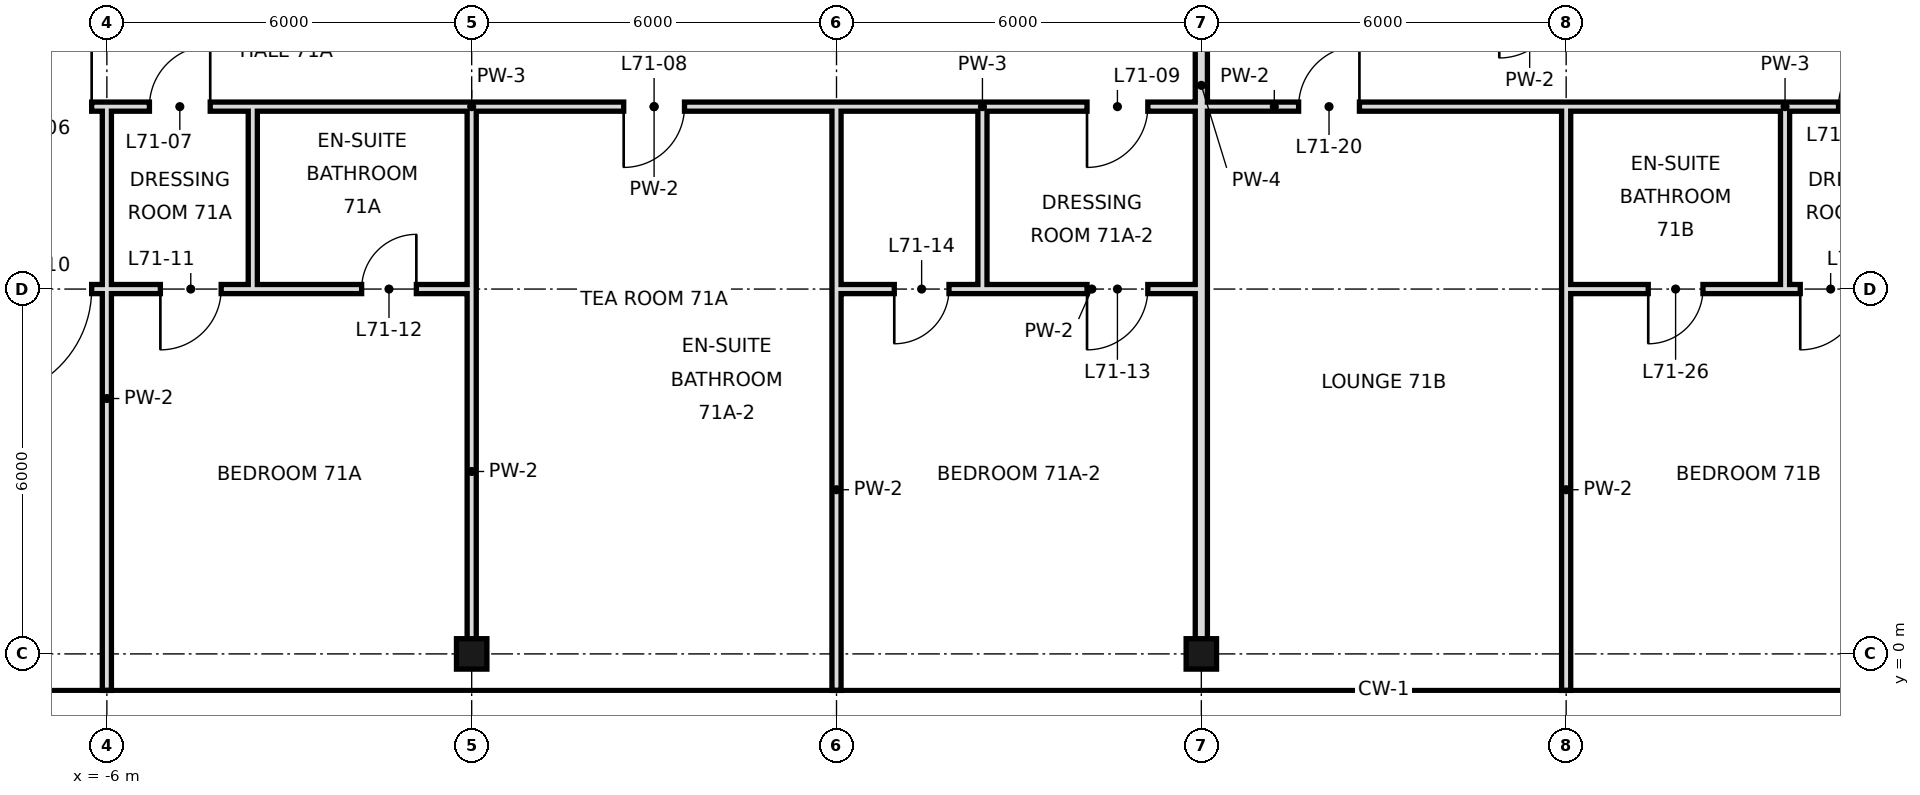
"""IFC4 building model, lengths in metres.
Left out: names, types, materials, properties, quantities, classifications, styles, units other than length and angle.
Written with IfcOpenShell. Run it as: python <this file> out.ifc"""

import sys

from ifc_helpers import new_model, si_unit, direction, frame, frame_2d, origin, origin_2d, place, context, subcontext, project, spatial, rectangle, hollow_rectangle, extrude, element, fill, save


model = new_model("IFC4")
c1 = context("Model", 3, precision=1e-05, world=origin(), true_north=direction((0.0, 1.0)))
c2 = subcontext(c1, "Body", "Model", "MODEL_VIEW")
j1 = project(units=[si_unit("LENGTHUNIT", "METRE"), si_unit("PLANEANGLEUNIT", "RADIAN")], contexts=[c1])
p1 = place(None, origin())
s1 = spatial("IfcSite", under=j1, at=p1, CompositionType="ELEMENT")
p2 = place(p1, origin())
s2 = spatial("IfcBuilding", under=s1, at=p2, CompositionType="ELEMENT")
p3 = place(p2, frame((0.0, 0.0, 301.6)))
s3 = spatial("IfcBuildingStorey", under=s2, at=p3, CompositionType="ELEMENT", Elevation=301.6)
for number, where, z_axis, x_axis in (
    (1, (0.0, 0.0, 0.0), (0.0, 0.0, 1.0), (1.0, 0.0, 0.0)),
    (2, (12.0, 0.0, 0.0), (0.0, 0.0, 1.0), (1.0, 0.0, 0.0)),
):
    element("IfcColumn", number, at=place(p3, frame(where, z_axis=z_axis, x_axis=x_axis)), inside=s3, PredefinedType="COLUMN", context=c2, shape_type="SweptSolid", body=[
        extrude(hollow_rectangle(XDim=0.5, YDim=0.5, WallThickness=0.025, at=origin_2d()), origin(), (0.0, 0.0, 1.0), 3.6),
    ])
p4 = place(p3, frame((-3.6, 6.0, 0.0), z_axis=(0.0, 0.0, 1.0), x_axis=(0.0, 1.0, 0.0)))
e3 = element("IfcWall", 3, at=p4, inside=s3, PredefinedType="PARTITIONING", context=c2, shape_type="SweptSolid", body=[
    extrude(rectangle(XDim=3.0, YDim=0.15, at=frame_2d((1.5, 0.0))), origin(), (0.0, 0.0, 1.0), 3.42),
])
p5 = place(p3, frame((-6.0, -0.6, 0.0), z_axis=(0.0, 0.0, 1.0), x_axis=(0.0, 1.0, 0.0)))
e4 = element("IfcWall", 4, at=p5, inside=s3, PredefinedType="PARTITIONING", context=c2, shape_type="SweptSolid", body=[
    extrude(rectangle(XDim=9.6, YDim=0.15, at=frame_2d((4.8, 0.0))), origin(), (0.0, 0.0, 1.0), 3.42),
])
p6 = place(p3, frame((0.0, 0.0, 0.0), z_axis=(0.0, 0.0, 1.0), x_axis=(0.0, 1.0, 0.0)))
e5 = element("IfcWall", 5, at=p6, inside=s3, PredefinedType="PARTITIONING", context=c2, shape_type="SweptSolid", body=[
    extrude(rectangle(XDim=6.0, YDim=0.15, at=frame_2d((3.0, 0.0))), origin(), (0.0, 0.0, 1.0), 2.72),
])
p7 = place(p3, frame((0.0, 6.0, 0.0), z_axis=(0.0, 0.0, 1.0), x_axis=(0.0, 1.0, 0.0)))
e6 = element("IfcWall", 6, at=p7, inside=s3, PredefinedType="PARTITIONING", context=c2, shape_type="SweptSolid", body=[
    extrude(rectangle(XDim=3.0, YDim=0.15, at=frame_2d((1.5, 0.0))), origin(), (0.0, 0.0, 1.0), 2.72),
])
p8 = place(p3, frame((12.0, 0.0, 0.0), z_axis=(0.0, 0.0, 1.0), x_axis=(0.0, 1.0, 0.0)))
e7 = element("IfcWall", 7, at=p8, inside=s3, PredefinedType="SOLIDWALL", context=c2, shape_type="SweptSolid", body=[
    extrude(rectangle(XDim=18.7, YDim=0.2, at=frame_2d((9.35, 0.0))), origin(), (0.0, 0.0, 1.0), 2.72),
])
p9 = place(p3, frame((18.0, -0.6, 0.0), z_axis=(0.0, 0.0, 1.0), x_axis=(0.0, 1.0, 0.0)))
e8 = element("IfcWall", 8, at=p9, inside=s3, PredefinedType="PARTITIONING", context=c2, shape_type="SweptSolid", body=[
    extrude(rectangle(XDim=6.6, YDim=0.15, at=frame_2d((3.3, 0.0))), origin(), (0.0, 0.0, 1.0), 2.72),
])
p10 = place(p3, frame((18.0, 6.0, 0.0), z_axis=(0.0, 0.0, 1.0), x_axis=(0.0, 1.0, 0.0)))
e9 = element("IfcWall", 9, at=p10, inside=s3, PredefinedType="PARTITIONING", context=c2, shape_type="SweptSolid", body=[
    extrude(rectangle(XDim=3.0, YDim=0.15, at=frame_2d((1.5, 0.0))), origin(), (0.0, 0.0, 1.0), 2.72),
])
p11 = place(p3, frame((21.6, 6.0, 0.0), z_axis=(0.0, 0.0, 1.0), x_axis=(0.0, 1.0, 0.0)))
e10 = element("IfcWall", 10, at=p11, inside=s3, PredefinedType="PARTITIONING", context=c2, shape_type="SweptSolid", body=[
    extrude(rectangle(XDim=3.0, YDim=0.15, at=frame_2d((1.5, 0.0))), origin(), (0.0, 0.0, 1.0), 3.42),
])
p12 = place(p3, frame((6.0, -0.6, 0.0), z_axis=(0.0, 0.0, 1.0), x_axis=(0.0, 1.0, 0.0)))
e11 = element("IfcWall", 11, at=p12, inside=s3, PredefinedType="PARTITIONING", context=c2, shape_type="SweptSolid", body=[
    extrude(rectangle(XDim=6.6, YDim=0.15, at=frame_2d((3.3, 0.0))), origin(), (0.0, 0.0, 1.0), 2.72),
])
p13 = place(p3, frame((6.0, 6.0, 0.0), z_axis=(0.0, 0.0, 1.0), x_axis=(0.0, 1.0, 0.0)))
e12 = element("IfcWall", 12, at=p13, inside=s3, PredefinedType="PARTITIONING", context=c2, shape_type="SweptSolid", body=[
    extrude(rectangle(XDim=3.0, YDim=0.15, at=frame_2d((1.5, 0.0))), origin(), (0.0, 0.0, 1.0), 2.72),
])
p14 = place(p3, frame((8.4, 6.0, 0.0), z_axis=(0.0, 0.0, 1.0), x_axis=(0.0, 1.0, 0.0)))
e13 = element("IfcWall", 13, at=p14, inside=s3, PredefinedType="PARTITIONING", context=c2, shape_type="SweptSolid", body=[
    extrude(rectangle(XDim=3.0, YDim=0.15, at=frame_2d((1.5, 0.0))), origin(), (0.0, 0.0, 1.0), 3.42),
])
p15 = place(p3, frame((-18.0, 6.0, 0.0), z_axis=(0.0, 0.0, 1.0), x_axis=(1.0, 0.0, 0.0)))
e14 = element("IfcWall", 14, at=p15, inside=s3, PredefinedType="PARTITIONING", context=c2, shape_type="SweptSolid", body=[
    extrude(rectangle(XDim=14.4, YDim=0.15, at=frame_2d((7.2, 0.0))), origin(), (0.0, 0.0, 1.0), 2.72),
])
p16 = place(p15, frame((9.95, 0.0, 0.0)))
e15 = element("IfcOpeningElement", 15, at=p16, cuts=e14, PredefinedType="OPENING", context=c2, shape_type="SweptSolid", body=[
    extrude(rectangle(XDim=1.8, YDim=2.4, at=frame_2d((0.9, 1.2))), frame((0.0, 0.085, 0.0), z_axis=(0.0, -1.0, 0.0), x_axis=(1.0, 0.0, 0.0)), (0.0, 0.0, 1.0), 0.17),
])
p17 = place(p15, frame((12.88, 0.0, 0.0)))
e16 = element("IfcOpeningElement", 16, at=p17, cuts=e14, PredefinedType="OPENING", context=c2, shape_type="SweptSolid", body=[
    extrude(rectangle(XDim=1.0, YDim=2.4, at=frame_2d((0.5, 1.2))), frame((0.0, 0.085, 0.0), z_axis=(0.0, -1.0, 0.0), x_axis=(1.0, 0.0, 0.0)), (0.0, 0.0, 1.0), 0.17),
])
p18 = place(p3, frame((8.4, 6.0, 0.0), z_axis=(0.0, 0.0, 1.0), x_axis=(1.0, 0.0, 0.0)))
e17 = element("IfcWall", 17, at=p18, inside=s3, PredefinedType="PARTITIONING", context=c2, shape_type="SweptSolid", body=[
    extrude(rectangle(XDim=3.6, YDim=0.15, at=frame_2d((1.8, 0.0))), origin(), (0.0, 0.0, 1.0), 2.97),
])
p19 = place(p18, frame((1.72, 0.0, 0.0)))
e18 = element("IfcOpeningElement", 18, at=p19, cuts=e17, PredefinedType="OPENING", context=c2, shape_type="SweptSolid", body=[
    extrude(rectangle(XDim=1.0, YDim=2.4, at=frame_2d((0.5, 1.2))), frame((0.0, 0.085, 0.0), z_axis=(0.0, -1.0, 0.0), x_axis=(1.0, 0.0, 0.0)), (0.0, 0.0, 1.0), 0.17),
])
p20 = place(p3, frame((21.6, 6.0, 0.0), z_axis=(0.0, 0.0, 1.0), x_axis=(1.0, 0.0, 0.0)))
e19 = element("IfcWall", 19, at=p20, inside=s3, PredefinedType="PARTITIONING", context=c2, shape_type="SweptSolid", body=[
    extrude(rectangle(XDim=2.4, YDim=0.15, at=frame_2d((1.2, 0.0))), origin(), (0.0, 0.0, 1.0), 2.97),
])
p21 = place(p20, frame((0.25, 0.0, 0.0)))
e20 = element("IfcOpeningElement", 20, at=p21, cuts=e19, PredefinedType="OPENING", context=c2, shape_type="SweptSolid", body=[
    extrude(rectangle(XDim=1.0, YDim=2.4, at=frame_2d((0.5, 1.2))), frame((0.0, 0.085, 0.0), z_axis=(0.0, -1.0, 0.0), x_axis=(1.0, 0.0, 0.0)), (0.0, 0.0, 1.0), 0.17),
])
p22 = place(p3, frame((-3.6, 6.0, 0.0), z_axis=(0.0, 0.0, 1.0), x_axis=(1.0, 0.0, 0.0)))
e21 = element("IfcWall", 21, at=p22, inside=s3, PredefinedType="PARTITIONING", context=c2, shape_type="SweptSolid", body=[
    extrude(rectangle(XDim=3.6, YDim=0.15, at=frame_2d((1.8, 0.0))), origin(), (0.0, 0.0, 1.0), 2.72),
])
p23 = place(p22, frame((1.79, 0.0, 0.0)))
e22 = element("IfcOpeningElement", 22, at=p23, cuts=e21, PredefinedType="OPENING", context=c2, shape_type="SweptSolid", body=[
    extrude(rectangle(XDim=0.9, YDim=2.4, at=frame_2d((0.45, 1.2))), frame((0.0, 0.085, 0.0), z_axis=(0.0, -1.0, 0.0), x_axis=(1.0, 0.0, 0.0)), (0.0, 0.0, 1.0), 0.17),
])
p24 = place(p3, frame((6.0, 6.0, 0.0), z_axis=(0.0, 0.0, 1.0), x_axis=(1.0, 0.0, 0.0)))
e23 = element("IfcWall", 23, at=p24, inside=s3, PredefinedType="PARTITIONING", context=c2, shape_type="SweptSolid", body=[
    extrude(rectangle(XDim=2.4, YDim=0.15, at=frame_2d((1.2, 0.0))), origin(), (0.0, 0.0, 1.0), 2.97),
])
p25 = place(p24, frame((0.95, 0.0, 0.0)))
e24 = element("IfcOpeningElement", 24, at=p25, cuts=e23, PredefinedType="OPENING", context=c2, shape_type="SweptSolid", body=[
    extrude(rectangle(XDim=0.9, YDim=2.4, at=frame_2d((0.45, 1.2))), frame((0.0, 0.085, 0.0), z_axis=(0.0, -1.0, 0.0), x_axis=(1.0, 0.0, 0.0)), (0.0, 0.0, 1.0), 0.17),
])
p26 = place(p3, frame((18.0, 6.0, 0.0), z_axis=(0.0, 0.0, 1.0), x_axis=(1.0, 0.0, 0.0)))
e25 = element("IfcWall", 25, at=p26, inside=s3, PredefinedType="PARTITIONING", context=c2, shape_type="SweptSolid", body=[
    extrude(rectangle(XDim=3.6, YDim=0.15, at=frame_2d((1.8, 0.0))), origin(), (0.0, 0.0, 1.0), 2.97),
])
p27 = place(p26, frame((1.35, 0.0, 0.0)))
e26 = element("IfcOpeningElement", 26, at=p27, cuts=e25, PredefinedType="OPENING", context=c2, shape_type="SweptSolid", body=[
    extrude(rectangle(XDim=0.9, YDim=2.4, at=frame_2d((0.45, 1.2))), frame((0.0, 0.085, 0.0), z_axis=(0.0, -1.0, 0.0), x_axis=(1.0, 0.0, 0.0)), (0.0, 0.0, 1.0), 0.17),
])
p28 = place(p3, frame((-18.6, 9.0, 0.0), z_axis=(0.0, 0.0, 1.0), x_axis=(1.0, 0.0, 0.0)))
e27 = element("IfcWall", 27, at=p28, inside=s3, PredefinedType="PARTITIONING", context=c2, shape_type="SweptSolid", body=[
    extrude(rectangle(XDim=15.0, YDim=0.15, at=frame_2d((7.5, 0.0))), origin(), (0.0, 0.0, 1.0), 3.42),
])
p29 = place(p28, frame((10.55, 0.0, 0.0)))
e28 = element("IfcOpeningElement", 28, at=p29, cuts=e27, PredefinedType="OPENING", context=c2, shape_type="SweptSolid", body=[
    extrude(rectangle(XDim=1.8, YDim=2.4, at=frame_2d((0.9, 1.2))), frame((0.0, 0.085, 0.0), z_axis=(0.0, -1.0, 0.0), x_axis=(1.0, 0.0, 0.0)), (0.0, 0.0, 1.0), 0.17),
])
p30 = place(p28, frame((13.3, 0.0, 0.0)))
e29 = element("IfcOpeningElement", 29, at=p30, cuts=e27, PredefinedType="OPENING", context=c2, shape_type="SweptSolid", body=[
    extrude(rectangle(XDim=1.0, YDim=2.4, at=frame_2d((0.5, 1.2))), frame((0.0, 0.085, 0.0), z_axis=(0.0, -1.0, 0.0), x_axis=(1.0, 0.0, 0.0)), (0.0, 0.0, 1.0), 0.17),
])
p31 = place(p3, frame((0.0, 9.0, 0.0), z_axis=(0.0, 0.0, 1.0), x_axis=(1.0, 0.0, 0.0)))
e30 = element("IfcWall", 30, at=p31, inside=s3, PredefinedType="PARTITIONING", context=c2, shape_type="SweptSolid", body=[
    extrude(rectangle(XDim=6.0, YDim=0.15, at=frame_2d((3.0, 0.0))), origin(), (0.0, 0.0, 1.0), 3.42),
])
p32 = place(p31, frame((2.5, 0.0, 0.0)))
e31 = element("IfcOpeningElement", 31, at=p32, cuts=e30, PredefinedType="OPENING", context=c2, shape_type="SweptSolid", body=[
    extrude(rectangle(XDim=1.0, YDim=2.4, at=frame_2d((0.5, 1.2))), frame((0.0, 0.085, 0.0), z_axis=(0.0, -1.0, 0.0), x_axis=(1.0, 0.0, 0.0)), (0.0, 0.0, 1.0), 0.17),
])
p33 = place(p3, frame((8.4, 9.0, 0.0), z_axis=(0.0, 0.0, 1.0), x_axis=(1.0, 0.0, 0.0)))
e32 = element("IfcWall", 32, at=p33, inside=s3, PredefinedType="PARTITIONING", context=c2, shape_type="SweptSolid", body=[
    extrude(rectangle(XDim=9.6, YDim=0.15, at=frame_2d((4.8, 0.0))), origin(), (0.0, 0.0, 1.0), 3.42),
])
p34 = place(p33, frame((1.72, 0.0, 0.0)))
e33 = element("IfcOpeningElement", 33, at=p34, cuts=e32, PredefinedType="OPENING", context=c2, shape_type="SweptSolid", body=[
    extrude(rectangle(XDim=1.0, YDim=2.4, at=frame_2d((0.5, 1.2))), frame((0.0, 0.085, 0.0), z_axis=(0.0, -1.0, 0.0), x_axis=(1.0, 0.0, 0.0)), (0.0, 0.0, 1.0), 0.17),
])
p35 = place(p33, frame((5.2, 0.0, 0.0)))
e34 = element("IfcOpeningElement", 34, at=p35, cuts=e32, PredefinedType="OPENING", context=c2, shape_type="SweptSolid", body=[
    extrude(rectangle(XDim=1.0, YDim=2.4, at=frame_2d((0.5, 1.2))), frame((0.0, 0.085, 0.0), z_axis=(0.0, -1.0, 0.0), x_axis=(1.0, 0.0, 0.0)), (0.0, 0.0, 1.0), 0.17),
])
p36 = place(p3, frame((21.6, 9.0, 0.0), z_axis=(0.0, 0.0, 1.0), x_axis=(1.0, 0.0, 0.0)))
e35 = element("IfcWall", 35, at=p36, inside=s3, PredefinedType="PARTITIONING", context=c2, shape_type="SweptSolid", body=[
    extrude(rectangle(XDim=2.4, YDim=0.15, at=frame_2d((1.2, 0.0))), origin(), (0.0, 0.0, 1.0), 3.42),
])
p37 = place(p36, frame((0.88, 0.0, 0.0)))
e36 = element("IfcOpeningElement", 36, at=p37, cuts=e35, PredefinedType="OPENING", context=c2, shape_type="SweptSolid", body=[
    extrude(rectangle(XDim=1.0, YDim=2.4, at=frame_2d((0.5, 1.2))), frame((0.0, 0.085, 0.0), z_axis=(0.0, -1.0, 0.0), x_axis=(1.0, 0.0, 0.0)), (0.0, 0.0, 1.0), 0.17),
])
p38 = place(p3, frame((-3.6, 9.0, 0.0), z_axis=(0.0, 0.0, 1.0), x_axis=(1.0, 0.0, 0.0)))
e37 = element("IfcWall", 37, at=p38, inside=s3, PredefinedType="PARTITIONING", context=c2, shape_type="SweptSolid", body=[
    extrude(rectangle(XDim=3.6, YDim=0.15, at=frame_2d((1.8, 0.0))), origin(), (0.0, 0.0, 1.0), 3.42),
])
p39 = place(p3, frame((6.0, 9.0, 0.0), z_axis=(0.0, 0.0, 1.0), x_axis=(1.0, 0.0, 0.0)))
e38 = element("IfcWall", 38, at=p39, inside=s3, PredefinedType="PARTITIONING", context=c2, shape_type="SweptSolid", body=[
    extrude(rectangle(XDim=2.4, YDim=0.15, at=frame_2d((1.2, 0.0))), origin(), (0.0, 0.0, 1.0), 3.42),
])
p40 = place(p3, frame((18.0, 9.0, 0.0), z_axis=(0.0, 0.0, 1.0), x_axis=(1.0, 0.0, 0.0)))
e39 = element("IfcWall", 39, at=p40, inside=s3, PredefinedType="PARTITIONING", context=c2, shape_type="SweptSolid", body=[
    extrude(rectangle(XDim=3.6, YDim=0.15, at=frame_2d((1.8, 0.0))), origin(), (0.0, 0.0, 1.0), 3.42),
])
p41 = place(p29, frame((1.8, 0.0, 0.0), z_axis=(0.0, 0.0, 1.0), x_axis=(-1.0, 0.0, 0.0)))
e40 = element("IfcDoor", 40, at=p41, inside=s3, OperationType="SINGLE_SWING_LEFT", PredefinedType="DOOR", context=c2, shape_type="SweptSolid", body=[
    extrude(rectangle(XDim=1.8, YDim=2.4, at=frame_2d((0.9, 1.2))), frame((0.0, 0.025, 0.0), z_axis=(0.0, -1.0, 0.0), x_axis=(1.0, 0.0, 0.0)), (0.0, 0.0, 1.0), 0.05),
])
fill(e28, e40)
p42 = place(p30, frame((1.0, 0.0, 0.0), z_axis=(0.0, 0.0, 1.0), x_axis=(-1.0, 0.0, 0.0)))
e41 = element("IfcDoor", 41, at=p42, inside=s3, OperationType="SINGLE_SWING_LEFT", PredefinedType="DOOR", context=c2, shape_type="SweptSolid", body=[
    extrude(rectangle(XDim=1.0, YDim=2.4, at=frame_2d((0.5, 1.2))), frame((0.0, 0.025, 0.0), z_axis=(0.0, -1.0, 0.0), x_axis=(1.0, 0.0, 0.0)), (0.0, 0.0, 1.0), 0.05),
])
fill(e29, e41)
p43 = place(p32, frame((1.0, 0.0, 0.0), z_axis=(0.0, 0.0, 1.0), x_axis=(-1.0, 0.0, 0.0)))
e42 = element("IfcDoor", 42, at=p43, inside=s3, OperationType="SINGLE_SWING_RIGHT", PredefinedType="DOOR", context=c2, shape_type="SweptSolid", body=[
    extrude(rectangle(XDim=1.0, YDim=2.4, at=frame_2d((0.5, 1.2))), frame((0.0, 0.025, 0.0), z_axis=(0.0, -1.0, 0.0), x_axis=(1.0, 0.0, 0.0)), (0.0, 0.0, 1.0), 0.05),
])
fill(e31, e42)
p44 = place(p34, frame((1.0, 0.0, 0.0), z_axis=(0.0, 0.0, 1.0), x_axis=(-1.0, 0.0, 0.0)))
e43 = element("IfcDoor", 43, at=p44, inside=s3, OperationType="SINGLE_SWING_RIGHT", PredefinedType="DOOR", context=c2, shape_type="SweptSolid", body=[
    extrude(rectangle(XDim=1.0, YDim=2.4, at=frame_2d((0.5, 1.2))), frame((0.0, 0.025, 0.0), z_axis=(0.0, -1.0, 0.0), x_axis=(1.0, 0.0, 0.0)), (0.0, 0.0, 1.0), 0.05),
])
fill(e33, e43)
p45 = place(p16, frame((1.8, 0.0, 0.0), z_axis=(0.0, 0.0, 1.0), x_axis=(-1.0, 0.0, 0.0)))
e44 = element("IfcDoor", 44, at=p45, inside=s3, OperationType="SINGLE_SWING_RIGHT", PredefinedType="DOOR", context=c2, shape_type="SweptSolid", body=[
    extrude(rectangle(XDim=1.8, YDim=2.4, at=frame_2d((0.9, 1.2))), frame((0.0, 0.025, 0.0), z_axis=(0.0, -1.0, 0.0), x_axis=(1.0, 0.0, 0.0)), (0.0, 0.0, 1.0), 0.05),
])
fill(e15, e44)
p46 = place(p17, frame((1.0, 0.0, 0.0), z_axis=(0.0, 0.0, 1.0), x_axis=(-1.0, 0.0, 0.0)))
e45 = element("IfcDoor", 45, at=p46, inside=s3, OperationType="SINGLE_SWING_RIGHT", PredefinedType="DOOR", context=c2, shape_type="SweptSolid", body=[
    extrude(rectangle(XDim=1.0, YDim=2.4, at=frame_2d((0.5, 1.2))), frame((0.0, 0.025, 0.0), z_axis=(0.0, -1.0, 0.0), x_axis=(1.0, 0.0, 0.0)), (0.0, 0.0, 1.0), 0.05),
])
fill(e16, e45)
p47 = place(p23, frame((0.9, 0.0, 0.0), z_axis=(0.0, 0.0, 1.0), x_axis=(-1.0, 0.0, 0.0)))
e46 = element("IfcDoor", 46, at=p47, inside=s3, OperationType="SINGLE_SWING_LEFT", PredefinedType="DOOR", context=c2, shape_type="SweptSolid", body=[
    extrude(rectangle(XDim=0.9, YDim=2.4, at=frame_2d((0.45, 1.2))), frame((0.0, 0.025, 0.0), z_axis=(0.0, -1.0, 0.0), x_axis=(1.0, 0.0, 0.0)), (0.0, 0.0, 1.0), 0.05),
])
fill(e22, e46)
p48 = place(p19, frame((1.0, 0.0, 0.0), z_axis=(0.0, 0.0, 1.0), x_axis=(-1.0, 0.0, 0.0)))
e47 = element("IfcDoor", 47, at=p48, inside=s3, OperationType="SINGLE_SWING_RIGHT", PredefinedType="DOOR", context=c2, shape_type="SweptSolid", body=[
    extrude(rectangle(XDim=1.0, YDim=2.4, at=frame_2d((0.5, 1.2))), frame((0.0, 0.025, 0.0), z_axis=(0.0, -1.0, 0.0), x_axis=(1.0, 0.0, 0.0)), (0.0, 0.0, 1.0), 0.05),
])
fill(e18, e47)
p49 = place(p25, frame((0.9, 0.0, 0.0), z_axis=(0.0, 0.0, 1.0), x_axis=(-1.0, 0.0, 0.0)))
e48 = element("IfcDoor", 48, at=p49, inside=s3, OperationType="SINGLE_SWING_RIGHT", PredefinedType="DOOR", context=c2, shape_type="SweptSolid", body=[
    extrude(rectangle(XDim=0.9, YDim=2.4, at=frame_2d((0.45, 1.2))), frame((0.0, 0.025, 0.0), z_axis=(0.0, -1.0, 0.0), x_axis=(1.0, 0.0, 0.0)), (0.0, 0.0, 1.0), 0.05),
])
fill(e24, e48)
p50 = place(p35, frame((1.0, 0.0, 0.0), z_axis=(0.0, 0.0, 1.0), x_axis=(-1.0, 0.0, 0.0)))
e49 = element("IfcDoor", 49, at=p50, inside=s3, OperationType="SINGLE_SWING_LEFT", PredefinedType="DOOR", context=c2, shape_type="SweptSolid", body=[
    extrude(rectangle(XDim=1.0, YDim=2.4, at=frame_2d((0.5, 1.2))), frame((0.0, 0.025, 0.0), z_axis=(0.0, -1.0, 0.0), x_axis=(1.0, 0.0, 0.0)), (0.0, 0.0, 1.0), 0.05),
])
fill(e34, e49)
p51 = place(p37, frame((1.0, 0.0, 0.0), z_axis=(0.0, 0.0, 1.0), x_axis=(-1.0, 0.0, 0.0)))
e50 = element("IfcDoor", 50, at=p51, inside=s3, OperationType="SINGLE_SWING_LEFT", PredefinedType="DOOR", context=c2, shape_type="SweptSolid", body=[
    extrude(rectangle(XDim=1.0, YDim=2.4, at=frame_2d((0.5, 1.2))), frame((0.0, 0.025, 0.0), z_axis=(0.0, -1.0, 0.0), x_axis=(1.0, 0.0, 0.0)), (0.0, 0.0, 1.0), 0.05),
])
fill(e36, e50)
p52 = place(p21, frame((1.0, 0.0, 0.0), z_axis=(0.0, 0.0, 1.0), x_axis=(-1.0, 0.0, 0.0)))
e51 = element("IfcDoor", 51, at=p52, inside=s3, OperationType="SINGLE_SWING_RIGHT", PredefinedType="DOOR", context=c2, shape_type="SweptSolid", body=[
    extrude(rectangle(XDim=1.0, YDim=2.4, at=frame_2d((0.5, 1.2))), frame((0.0, 0.025, 0.0), z_axis=(0.0, -1.0, 0.0), x_axis=(1.0, 0.0, 0.0)), (0.0, 0.0, 1.0), 0.05),
])
fill(e20, e51)
p53 = place(p27, frame((0.9, 0.0, 0.0), z_axis=(0.0, 0.0, 1.0), x_axis=(-1.0, 0.0, 0.0)))
e52 = element("IfcDoor", 52, at=p53, inside=s3, OperationType="SINGLE_SWING_RIGHT", PredefinedType="DOOR", context=c2, shape_type="SweptSolid", body=[
    extrude(rectangle(XDim=0.9, YDim=2.4, at=frame_2d((0.45, 1.2))), frame((0.0, 0.025, 0.0), z_axis=(0.0, -1.0, 0.0), x_axis=(1.0, 0.0, 0.0)), (0.0, 0.0, 1.0), 0.05),
])
fill(e26, e52)
save(model, sys.argv[1])
